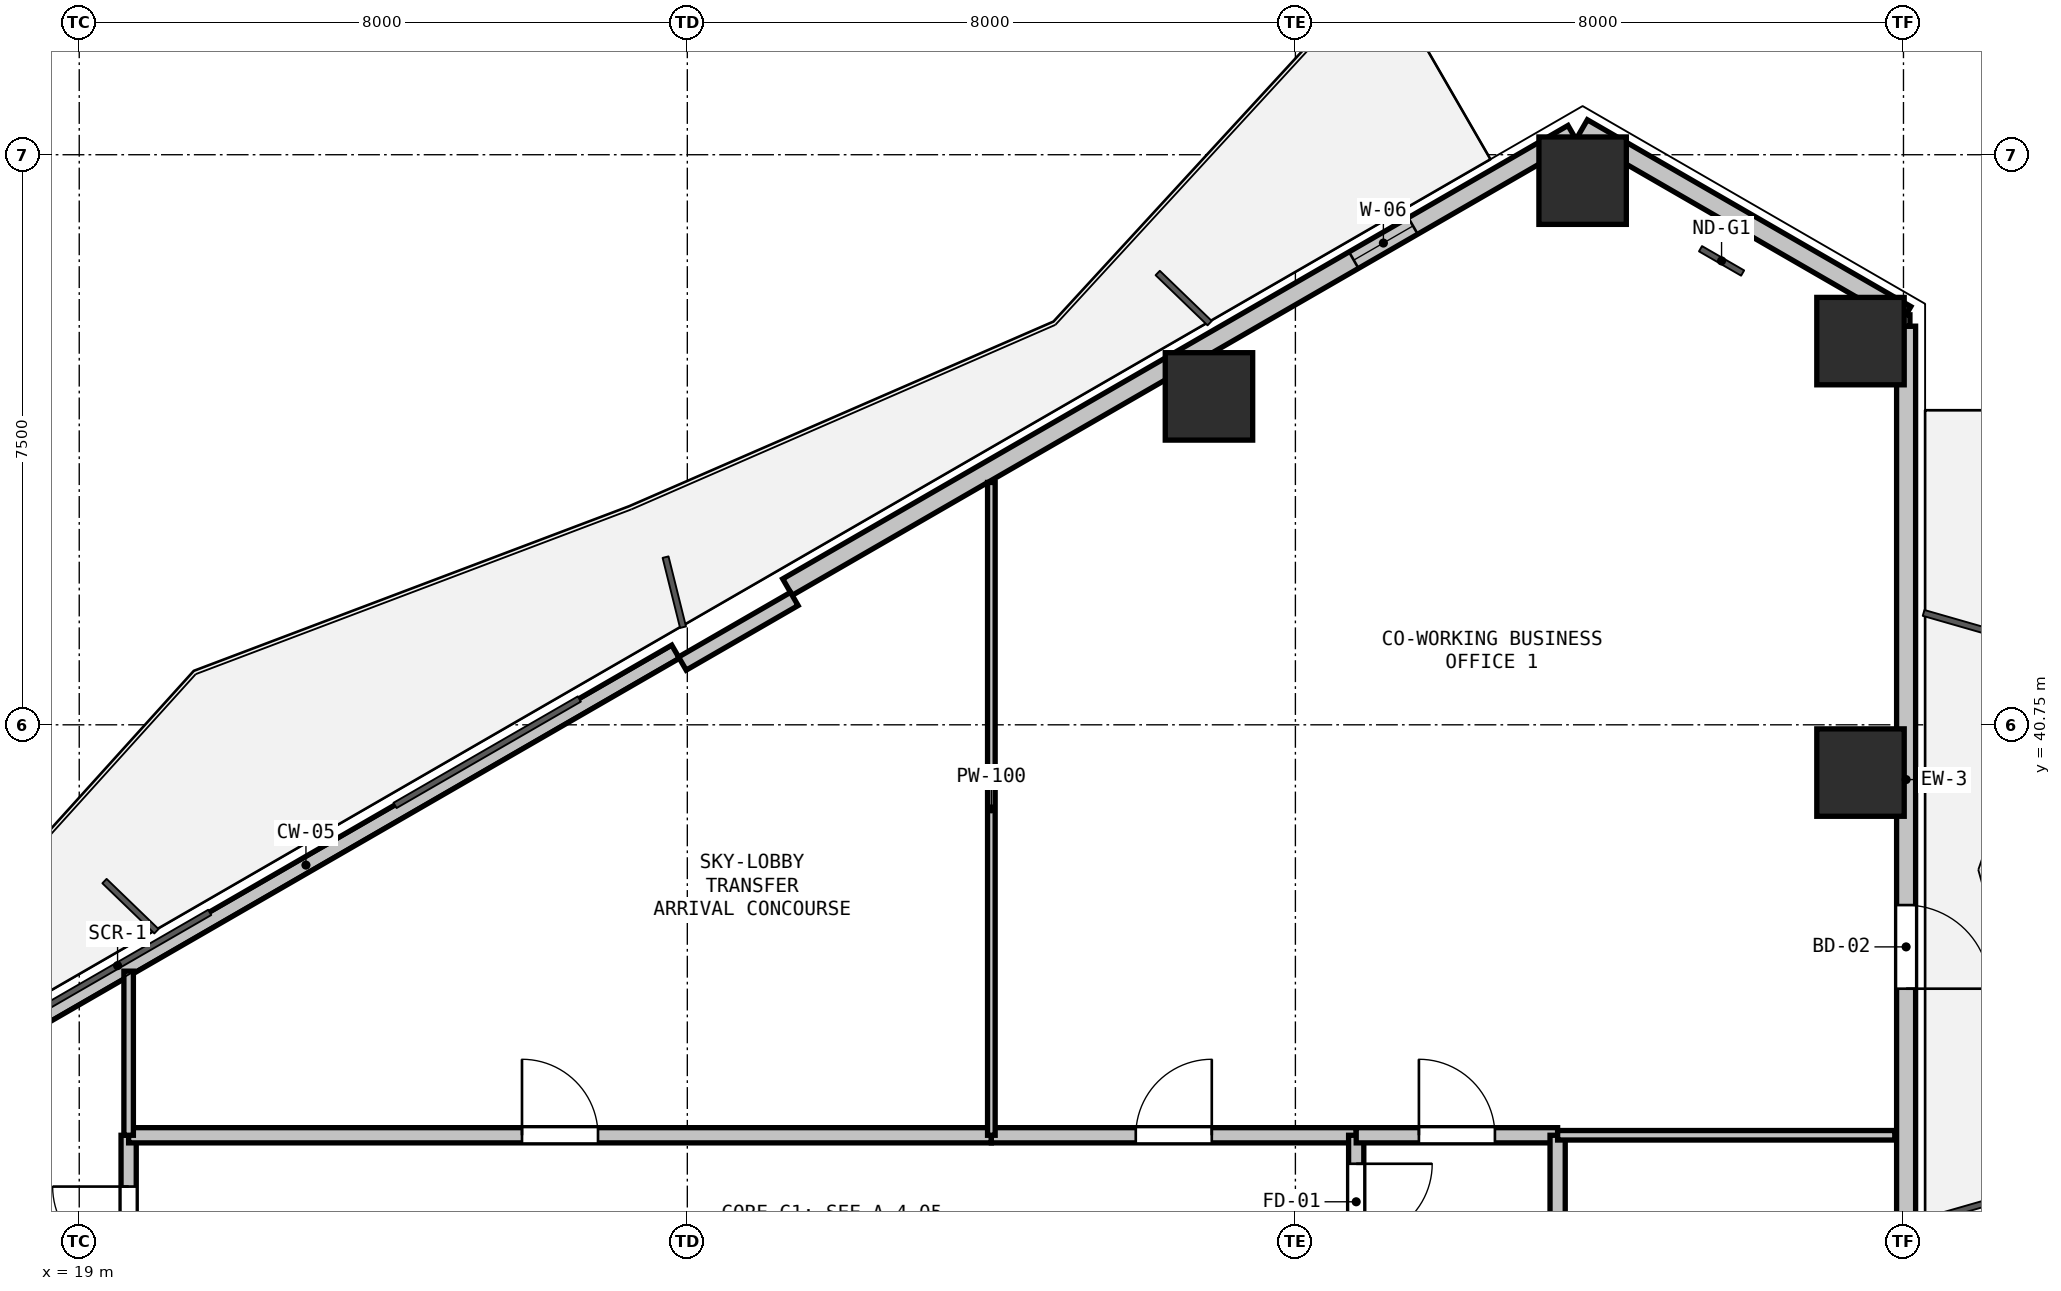
"""IFC4 building model, lengths in metres.
Left out: names, types, materials, properties, quantities, classifications, styles, units other than length and angle.
Written with IfcOpenShell. Run it as: python <this file> out.ifc"""

import sys

from ifc_helpers import new_model, si_unit, direction, frame, frame_2d, origin, origin_2d, place, context, subcontext, project, spatial, rectangle, hollow_rectangle, extrude, element, fill, save


model = new_model("IFC4")
c1 = context("Model", 3, precision=1e-05, world=origin(), true_north=direction((0.0, 1.0)))
c2 = subcontext(c1, "Body", "Model", "MODEL_VIEW")
j1 = project(units=[si_unit("LENGTHUNIT", "METRE"), si_unit("PLANEANGLEUNIT", "RADIAN")], contexts=[c1])
p1 = place(None, origin())
s1 = spatial("IfcSite", under=j1, at=p1, CompositionType="ELEMENT")
p2 = place(p1, origin())
s2 = spatial("IfcBuilding", under=s1, at=p2, CompositionType="ELEMENT")
p3 = place(p2, frame((0.0, 0.0, 116.4)))
s3 = spatial("IfcBuildingStorey", under=s2, at=p3, CompositionType="ELEMENT", Elevation=116.4)
p4 = place(p3, frame((33.863, 45.071, 0.0), z_axis=(0.0, 0.0, 1.0), x_axis=(1.0, 0.0, 0.0)))
e1 = element("IfcColumn", 1, at=p4, inside=s3, PredefinedType="COLUMN", context=c2, shape_type="SweptSolid", body=[
    extrude(hollow_rectangle(XDim=1.15, YDim=1.15, WallThickness=0.032, at=origin_2d()), origin(), (0.0, 0.0, 1.0), 3.21),
])
for number, where, z_axis, x_axis in (
    (2, (38.779, 47.909, 0.0), (0.0, 0.0, 1.0), (1.0, 0.0, 0.0)),
    (3, (42.435, 45.798, 0.0), (0.0, 0.0, 1.0), (1.0, 0.0, 0.0)),
):
    element("IfcColumn", number, at=place(p3, frame(where, z_axis=z_axis, x_axis=x_axis)), inside=s3, PredefinedType="COLUMN", context=c2, shape_type="SweptSolid", body=[
        extrude(hollow_rectangle(XDim=1.15, YDim=1.15, WallThickness=0.032, at=origin_2d()), origin(), (0.0, 0.0, 1.0), 2.96),
    ])
p5 = place(p3, frame((42.435, 40.122, 0.0), z_axis=(0.0, 0.0, 1.0), x_axis=(1.0, 0.0, 0.0)))
e4 = element("IfcColumn", 4, at=p5, inside=s3, PredefinedType="COLUMN", context=c2, shape_type="SweptSolid", body=[
    extrude(hollow_rectangle(XDim=1.15, YDim=1.15, WallThickness=0.032, at=origin_2d()), origin(), (0.0, 0.0, 1.0), 3.21),
])
p6 = place(p3, frame((38.779, 48.602, 0.0), z_axis=(0.0, 0.0, 1.0), x_axis=(0.866011848704, -0.500023477353, 0.0)))
e5 = element("IfcWall", 5, at=p6, inside=s3, PredefinedType="SOLIDWALL", context=c2, shape_type="SweptSolid", body=[
    extrude(rectangle(XDim=4.914, YDim=0.25, at=frame_2d((2.457, 0.0))), origin(), (0.0, 0.0, 1.0), 4.18),
])
p7 = place(p3, frame((17.12, 36.097, 0.0), z_axis=(0.0, 0.0, 1.0), x_axis=(0.866027010039, 0.499997217876, 0.0)))
e6 = element("IfcWall", 6, at=p7, inside=s3, PredefinedType="PARAPET", context=c2, shape_type="SweptSolid", body=[
    extrude(rectangle(XDim=11.229, YDim=0.2, at=frame_2d((5.615, 0.0))), origin(), (0.0, 0.0, 1.0), 0.2),
])
p8 = place(p3, frame((28.317, 42.562, 0.0), z_axis=(0.0, 0.0, 1.0), x_axis=(0.866023023012, 0.500004123596, 0.0)))
e7 = element("IfcWall", 7, at=p8, inside=s3, PredefinedType="SOLIDWALL", context=c2, shape_type="SweptSolid", body=[
    extrude(rectangle(XDim=11.93, YDim=0.25, at=frame_2d((5.965, 0.0))), origin(), (0.0, 0.0, 1.0), 2.945),
])
p9 = place(p8, frame((8.603, 0.0, 0.9)))
e8 = element("IfcOpeningElement", 8, at=p9, cuts=e7, PredefinedType="OPENING", context=c2, shape_type="SweptSolid", body=[
    extrude(rectangle(XDim=0.9, YDim=1.4, at=frame_2d((0.45, 0.7))), frame((0.0, 0.135, 0.0), z_axis=(0.0, -1.0, 0.0), x_axis=(1.0, 0.0, 0.0)), (0.0, 0.0, 1.0), 0.27),
])
p10 = place(p3, frame((26.935, 41.556, 0.0), z_axis=(0.0, 0.0, 1.0), x_axis=(0.86605165483, 0.499954529098, 0.0)))
e9 = element("IfcWall", 9, at=p10, inside=s3, PredefinedType="PARAPET", context=c2, shape_type="SweptSolid", body=[
    extrude(rectangle(XDim=1.7, YDim=0.2, at=frame_2d((0.85, 0.0))), origin(), (0.0, 0.0, 1.0), 4.18),
])
p11 = place(p3, frame((43.035, 45.994, 0.0), z_axis=(0.0, 0.0, 1.0), x_axis=(0.0, -1.0, 0.0)))
e10 = element("IfcWall", 10, at=p11, inside=s3, PredefinedType="SOLIDWALL", context=c2, shape_type="SweptSolid", body=[
    extrude(rectangle(XDim=11.93, YDim=0.25, at=frame_2d((5.965, 0.0))), origin(), (0.0, 0.0, 1.0), 2.945),
])
p12 = place(p11, frame((7.616, 0.0, 0.0)))
e11 = element("IfcOpeningElement", 11, at=p12, cuts=e10, PredefinedType="OPENING", context=c2, shape_type="SweptSolid", body=[
    extrude(rectangle(XDim=1.1, YDim=2.1, at=frame_2d((0.55, 1.05))), frame((0.0, 0.135, 0.0), z_axis=(0.0, -1.0, 0.0), x_axis=(1.0, 0.0, 0.0)), (0.0, 0.0, 1.0), 0.27),
])
p13 = place(p3, frame((19.65, 33.0, 0.0), z_axis=(0.0, 0.0, 1.0), x_axis=(0.0, 1.0, 0.0)))
e12 = element("IfcWall", 12, at=p13, inside=s3, PredefinedType="PARTITIONING", context=c2, shape_type="SweptSolid", body=[
    extrude(rectangle(XDim=2.35, YDim=0.2, at=frame_2d((1.175, 0.0))), origin(), (0.0, 0.0, 1.0), 4.56),
])
p14 = place(p13, frame((0.675, 0.0, 0.0)))
e13 = element("IfcOpeningElement", 13, at=p14, cuts=e12, PredefinedType="OPENING", context=c2, shape_type="SweptSolid", body=[
    extrude(rectangle(XDim=1.0, YDim=2.15, at=frame_2d((0.5, 1.075))), frame((0.0, 0.11, 0.0), z_axis=(0.0, -1.0, 0.0), x_axis=(1.0, 0.0, 0.0)), (0.0, 0.0, 1.0), 0.22),
])
p15 = place(p3, frame((19.65, 35.35, 0.0), z_axis=(0.0, 0.0, 1.0), x_axis=(1.0, 0.0, 0.0)))
e14 = element("IfcWall", 14, at=p15, inside=s3, PredefinedType="PARTITIONING", context=c2, shape_type="SweptSolid", body=[
    extrude(rectangle(XDim=11.35, YDim=0.2, at=frame_2d((5.675, 0.0))), origin(), (0.0, 0.0, 1.0), 3.195),
])
p16 = place(p15, frame((5.175, 0.0, 0.0)))
e15 = element("IfcOpeningElement", 15, at=p16, cuts=e14, PredefinedType="OPENING", context=c2, shape_type="SweptSolid", body=[
    extrude(rectangle(XDim=1.0, YDim=2.15, at=frame_2d((0.5, 1.075))), frame((0.0, 0.11, 0.0), z_axis=(0.0, -1.0, 0.0), x_axis=(1.0, 0.0, 0.0)), (0.0, 0.0, 1.0), 0.22),
])
p17 = place(p3, frame((31.0, 35.35, 0.0), z_axis=(0.0, 0.0, 1.0), x_axis=(1.0, 0.0, 0.0)))
e16 = element("IfcWall", 16, at=p17, inside=s3, PredefinedType="PARTITIONING", context=c2, shape_type="SweptSolid", body=[
    extrude(rectangle(XDim=4.8, YDim=0.2, at=frame_2d((2.4, 0.0))), origin(), (0.0, 0.0, 1.0), 2.945),
])
p18 = place(p17, frame((1.9, 0.0, 0.0)))
e17 = element("IfcOpeningElement", 17, at=p18, cuts=e16, PredefinedType="OPENING", context=c2, shape_type="SweptSolid", body=[
    extrude(rectangle(XDim=1.0, YDim=2.15, at=frame_2d((0.5, 1.075))), frame((0.0, 0.11, 0.0), z_axis=(0.0, -1.0, 0.0), x_axis=(1.0, 0.0, 0.0)), (0.0, 0.0, 1.0), 0.22),
])
p19 = place(p3, frame((35.8, 35.35, 0.0), z_axis=(0.0, 0.0, 1.0), x_axis=(0.0, -1.0, 0.0)))
e18 = element("IfcWall", 18, at=p19, inside=s3, PredefinedType="PARTITIONING", context=c2, shape_type="SweptSolid", body=[
    extrude(rectangle(XDim=1.75, YDim=0.2, at=frame_2d((0.875, 0.0))), origin(), (0.0, 0.0, 1.0), 2.945),
])
p20 = place(p19, frame((0.375, 0.0, 0.0)))
e19 = element("IfcOpeningElement", 19, at=p20, cuts=e18, PredefinedType="OPENING", context=c2, shape_type="SweptSolid", body=[
    extrude(rectangle(XDim=1.0, YDim=2.15, at=frame_2d((0.5, 1.075))), frame((0.0, 0.11, 0.0), z_axis=(0.0, -1.0, 0.0), x_axis=(1.0, 0.0, 0.0)), (0.0, 0.0, 1.0), 0.22),
])
p21 = place(p3, frame((35.8, 35.35, 0.0), z_axis=(0.0, 0.0, 1.0), x_axis=(1.0, 0.0, 0.0)))
e20 = element("IfcWall", 20, at=p21, inside=s3, PredefinedType="PARTITIONING", context=c2, shape_type="SweptSolid", body=[
    extrude(rectangle(XDim=2.65, YDim=0.2, at=frame_2d((1.325, 0.0))), origin(), (0.0, 0.0, 1.0), 2.945),
])
p22 = place(p21, frame((0.825, 0.0, 0.0)))
e21 = element("IfcOpeningElement", 21, at=p22, cuts=e20, PredefinedType="OPENING", context=c2, shape_type="SweptSolid", body=[
    extrude(rectangle(XDim=1.0, YDim=2.15, at=frame_2d((0.5, 1.075))), frame((0.0, 0.11, 0.0), z_axis=(0.0, -1.0, 0.0), x_axis=(1.0, 0.0, 0.0)), (0.0, 0.0, 1.0), 0.22),
])
p23 = place(p3, frame((38.45, 35.35, 0.0), z_axis=(0.0, 0.0, 1.0), x_axis=(0.0, -1.0, 0.0)))
e22 = element("IfcWall", 22, at=p23, inside=s3, PredefinedType="PARTITIONING", context=c2, shape_type="SweptSolid", body=[
    extrude(rectangle(XDim=17.2, YDim=0.2, at=frame_2d((8.6, 0.0))), origin(), (0.0, 0.0, 1.0), 3.195),
])
p24 = place(p23, frame((8.1, 0.0, 0.0)))
e23 = element("IfcOpeningElement", 23, at=p24, cuts=e22, PredefinedType="OPENING", context=c2, shape_type="SweptSolid", body=[
    extrude(rectangle(XDim=1.0, YDim=2.15, at=frame_2d((0.5, 1.075))), frame((0.0, 0.11, 0.0), z_axis=(0.0, -1.0, 0.0), x_axis=(1.0, 0.0, 0.0)), (0.0, 0.0, 1.0), 0.22),
])
p25 = place(p3, frame((19.65, 35.35, 0.0), z_axis=(0.0, 0.0, 1.0), x_axis=(0.0, 1.0, 0.0)))
e24 = element("IfcWall", 24, at=p25, inside=s3, PredefinedType="PARTITIONING", context=c2, shape_type="SweptSolid", body=[
    extrude(rectangle(XDim=2.159, YDim=0.125, at=frame_2d((1.08, 0.0))), origin(), (0.0, 0.0, 1.0), 2.365),
])
p26 = place(p3, frame((31.0, 43.938, 0.0), z_axis=(0.0, 0.0, 1.0), x_axis=(0.0, -1.0, 0.0)))
e25 = element("IfcWall", 25, at=p26, inside=s3, PredefinedType="PARTITIONING", context=c2, shape_type="SweptSolid", body=[
    extrude(rectangle(XDim=8.588, YDim=0.1, at=frame_2d((4.294, 0.0))), origin(), (0.0, 0.0, 1.0), 2.365),
])
p27 = place(p3, frame((42.885, 35.35, 0.0), z_axis=(0.0, 0.0, 1.0), x_axis=(-1.0, 0.0, 0.0)))
e26 = element("IfcWall", 26, at=p27, inside=s3, PredefinedType="PARTITIONING", context=c2, shape_type="SweptSolid", body=[
    extrude(rectangle(XDim=4.436, YDim=0.125, at=frame_2d((2.218, 0.0))), origin(), (0.0, 0.0, 1.0), 2.365),
])
p28 = place(p3, frame((43.035, 46.144, 0.0), z_axis=(0.0, 0.0, 1.0), x_axis=(0.0, -1.0, 0.0)))
e27 = element("IfcWall", 27, at=p28, inside=s3, PredefinedType="PARTITIONING", context=c2, shape_type="SweptSolid", body=[
    extrude(rectangle(XDim=0.15, YDim=0.1, at=frame_2d((0.075, 0.0))), origin(), (0.0, 0.0, 1.0), 4.56),
])
p29 = place(p9, origin())
e28 = element("IfcWindow", 28, at=p29, inside=s3, PartitioningType="SINGLE_PANEL", PredefinedType="WINDOW", context=c2, shape_type="SweptSolid", body=[
    extrude(rectangle(XDim=0.9, YDim=1.4, at=frame_2d((0.45, 0.7))), frame((0.0, 0.03, 0.0), z_axis=(0.0, -1.0, 0.0), x_axis=(1.0, 0.0, 0.0)), (0.0, 0.0, 1.0), 0.06),
])
fill(e8, e28)
p30 = place(p12, origin())
e29 = element("IfcDoor", 29, at=p30, inside=s3, OperationType="SINGLE_SWING_RIGHT", PredefinedType="DOOR", context=c2, shape_type="SweptSolid", body=[
    extrude(rectangle(XDim=1.1, YDim=2.1, at=frame_2d((0.55, 1.05))), frame((0.0, 0.025, 0.0), z_axis=(0.0, -1.0, 0.0), x_axis=(1.0, 0.0, 0.0)), (0.0, 0.0, 1.0), 0.05),
])
fill(e11, e29)
p31 = place(p20, origin())
e30 = element("IfcDoor", 30, at=p31, inside=s3, OperationType="SINGLE_SWING_LEFT", PredefinedType="DOOR", context=c2, shape_type="SweptSolid", body=[
    extrude(rectangle(XDim=1.0, YDim=2.15, at=frame_2d((0.5, 1.075))), frame((0.0, 0.025, 0.0), z_axis=(0.0, -1.0, 0.0), x_axis=(1.0, 0.0, 0.0)), (0.0, 0.0, 1.0), 0.05),
])
fill(e19, e30)
p32 = place(p16, origin())
e31 = element("IfcDoor", 31, at=p32, inside=s3, OperationType="SINGLE_SWING_LEFT", PredefinedType="DOOR", context=c2, shape_type="SweptSolid", body=[
    extrude(rectangle(XDim=1.0, YDim=2.15, at=frame_2d((0.5, 1.075))), frame((0.0, 0.025, 0.0), z_axis=(0.0, -1.0, 0.0), x_axis=(1.0, 0.0, 0.0)), (0.0, 0.0, 1.0), 0.05),
])
fill(e15, e31)
p33 = place(p18, origin())
e32 = element("IfcDoor", 32, at=p33, inside=s3, OperationType="SINGLE_SWING_RIGHT", PredefinedType="DOOR", context=c2, shape_type="SweptSolid", body=[
    extrude(rectangle(XDim=1.0, YDim=2.15, at=frame_2d((0.5, 1.075))), frame((0.0, 0.025, 0.0), z_axis=(0.0, -1.0, 0.0), x_axis=(1.0, 0.0, 0.0)), (0.0, 0.0, 1.0), 0.05),
])
fill(e17, e32)
p34 = place(p14, origin())
e33 = element("IfcDoor", 33, at=p34, inside=s3, OperationType="SINGLE_SWING_RIGHT", PredefinedType="DOOR", context=c2, shape_type="SweptSolid", body=[
    extrude(rectangle(XDim=1.0, YDim=2.15, at=frame_2d((0.5, 1.075))), frame((0.0, 0.025, 0.0), z_axis=(0.0, -1.0, 0.0), x_axis=(1.0, 0.0, 0.0)), (0.0, 0.0, 1.0), 0.05),
])
fill(e13, e33)
p35 = place(p22, origin())
e34 = element("IfcDoor", 34, at=p35, inside=s3, OperationType="SINGLE_SWING_LEFT", PredefinedType="DOOR", context=c2, shape_type="SweptSolid", body=[
    extrude(rectangle(XDim=1.0, YDim=2.15, at=frame_2d((0.5, 1.075))), frame((0.0, 0.025, 0.0), z_axis=(0.0, -1.0, 0.0), x_axis=(1.0, 0.0, 0.0)), (0.0, 0.0, 1.0), 0.05),
])
fill(e21, e34)
save(model, sys.argv[1])
